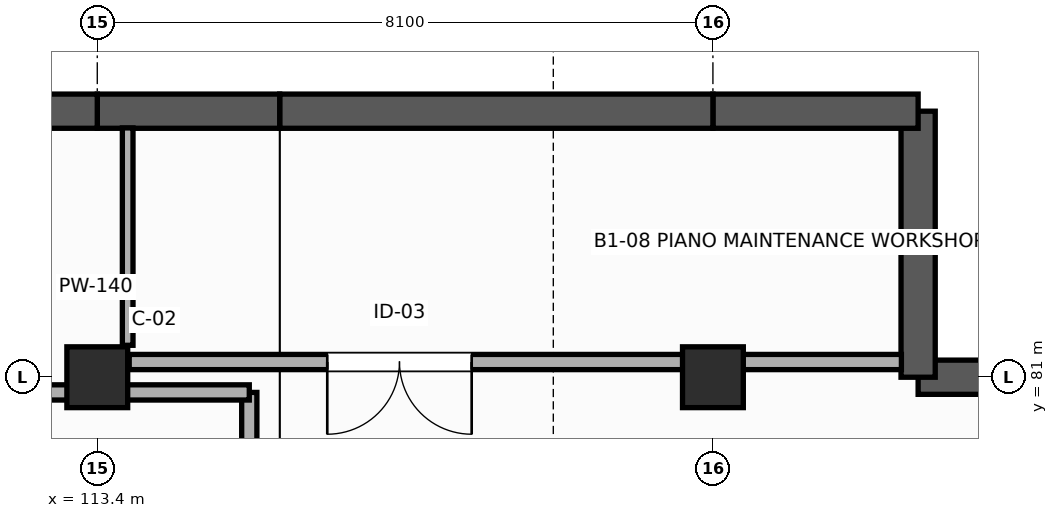
"""IFC4 building model, lengths in metres.
Left out: names, types, materials, properties, quantities, classifications, styles, units other than length and angle.
Written with IfcOpenShell. Run it as: python <this file> out.ifc"""

import sys

from ifc_helpers import new_model, si_unit, direction, frame, frame_2d, origin, origin_2d, place, context, subcontext, project, spatial, rectangle, extrude, element, fill, save


model = new_model("IFC4")
c1 = context("Model", 3, precision=1e-05, world=origin(), true_north=direction((0.0, 1.0)))
c2 = subcontext(c1, "Body", "Model", "MODEL_VIEW")
j1 = project(units=[si_unit("LENGTHUNIT", "METRE"), si_unit("PLANEANGLEUNIT", "RADIAN")], contexts=[c1])
p1 = place(None, origin())
s1 = spatial("IfcSite", under=j1, at=p1, CompositionType="ELEMENT")
p2 = place(p1, origin())
s2 = spatial("IfcBuilding", under=s1, at=p2, CompositionType="ELEMENT")
p3 = place(p2, frame((0.0, 0.0, -5.4)))
s3 = spatial("IfcBuildingStorey", under=s2, at=p3, CompositionType="ELEMENT", Elevation=-5.4)
for number, where, z_axis, x_axis in (
    (1, (113.4, 81.0, -0.4), (0.0, 0.0, 1.0), (1.0, 0.0, 0.0)),
    (2, (121.5, 81.0, -0.4), (0.0, 0.0, 1.0), (1.0, 0.0, 0.0)),
):
    element("IfcColumn", number, at=place(p3, frame(where, z_axis=z_axis, x_axis=x_axis)), inside=s3, PredefinedType="COLUMN", context=c2, shape_type="SweptSolid", body=[
        extrude(rectangle(XDim=0.8, YDim=0.8, at=origin_2d()), origin(), (0.0, 0.0, 1.0), 5.8),
    ])
p4 = place(p3, frame((129.2, 81.0, 0.0), z_axis=(0.0, 0.0, 1.0), x_axis=(-1.0, 0.0, 0.0)))
e3 = element("IfcWall", 3, at=p4, inside=s3, PredefinedType="USERDEFINED", context=c2, shape_type="SweptSolid", body=[
    extrude(rectangle(XDim=5.0, YDim=0.45, at=frame_2d((2.5, 0.0))), origin(), (0.0, 0.0, 1.0), 5.1),
])
p5 = place(p3, frame((124.2, 81.0, 0.0), z_axis=(0.0, 0.0, 1.0), x_axis=(0.0, 1.0, 0.0)))
e4 = element("IfcWall", 4, at=p5, inside=s3, PredefinedType="USERDEFINED", context=c2, shape_type="SweptSolid", body=[
    extrude(rectangle(XDim=3.5, YDim=0.45, at=frame_2d((1.75, 0.0))), origin(), (0.0, 0.0, 1.0), 5.1),
])
p6 = place(p3, frame((124.2, 84.5, 0.0), z_axis=(0.0, 0.0, 1.0), x_axis=(-1.0, 0.0, 0.0)))
e5 = element("IfcWall", 5, at=p6, inside=s3, PredefinedType="USERDEFINED", context=c2, shape_type="SweptSolid", body=[
    extrude(rectangle(XDim=2.7, YDim=0.45, at=frame_2d((1.35, 0.0))), origin(), (0.0, 0.0, 1.0), 5.1),
])
p7 = place(p3, frame((121.5, 84.5, 0.0), z_axis=(0.0, 0.0, 1.0), x_axis=(-1.0, 0.0, 0.0)))
e6 = element("IfcWall", 6, at=p7, inside=s3, PredefinedType="USERDEFINED", context=c2, shape_type="SweptSolid", body=[
    extrude(rectangle(XDim=5.7, YDim=0.45, at=frame_2d((2.85, 0.0))), origin(), (0.0, 0.0, 1.0), 5.1),
])
p8 = place(p3, frame((115.8, 84.5, 0.0), z_axis=(0.0, 0.0, 1.0), x_axis=(-1.0, 0.0, 0.0)))
e7 = element("IfcWall", 7, at=p8, inside=s3, PredefinedType="USERDEFINED", context=c2, shape_type="SweptSolid", body=[
    extrude(rectangle(XDim=2.4, YDim=0.45, at=frame_2d((1.2, 0.0))), origin(), (0.0, 0.0, 1.0), 5.1),
])
p9 = place(p3, frame((113.4, 84.5, 0.0), z_axis=(0.0, 0.0, 1.0), x_axis=(-1.0, 0.0, 0.0)))
e8 = element("IfcWall", 8, at=p9, inside=s3, PredefinedType="USERDEFINED", context=c2, shape_type="SweptSolid", body=[
    extrude(rectangle(XDim=8.1, YDim=0.45, at=frame_2d((4.05, 0.0))), origin(), (0.0, 0.0, 1.0), 5.1),
])
p10 = place(p3, frame((115.4, 80.8, 0.0), z_axis=(0.0, 0.0, 1.0), x_axis=(0.0, -1.0, 0.0)))
e9 = element("IfcWall", 9, at=p10, inside=s3, PredefinedType="PARTITIONING", context=c2, shape_type="SweptSolid", body=[
    extrude(rectangle(XDim=4.6, YDim=0.2, at=frame_2d((2.3, 0.0))), origin(), (0.0, 0.0, 1.0), 5.12),
])
p11 = place(p3, frame((106.399, 80.8, 0.0), z_axis=(0.0, 0.0, 1.0), x_axis=(1.0, 0.0, 0.0)))
e10 = element("IfcWall", 10, at=p11, inside=s3, PredefinedType="PARTITIONING", context=c2, shape_type="SweptSolid", body=[
    extrude(rectangle(XDim=9.001, YDim=0.2, at=frame_2d((4.5, 0.0))), origin(), (0.0, 0.0, 1.0), 4.254),
])
p12 = place(p11, frame((2.05, 0.0, 0.0)))
e11 = element("IfcOpeningElement", 11, at=p12, cuts=e10, PredefinedType="OPENING", context=c2, shape_type="SweptSolid", body=[
    extrude(rectangle(XDim=2.2, YDim=2.6, at=frame_2d((1.1, 1.3))), frame((0.0, 0.11, 0.0), z_axis=(0.0, -1.0, 0.0), x_axis=(1.0, 0.0, 0.0)), (0.0, 0.0, 1.0), 0.22),
])
p13 = place(p3, frame((123.98, 81.2, 0.0), z_axis=(0.0, 0.0, 1.0), x_axis=(-1.0, 0.0, 0.0)))
e12 = element("IfcWall", 12, at=p13, inside=s3, PredefinedType="PARTITIONING", context=c2, shape_type="SweptSolid", body=[
    extrude(rectangle(XDim=10.16, YDim=0.2, at=frame_2d((5.08, 0.0))), origin(), (0.0, 0.0, 1.0), 4.154),
])
p14 = place(p13, frame((5.654, 0.0, 0.0)))
e13 = element("IfcOpeningElement", 13, at=p14, cuts=e12, PredefinedType="OPENING", context=c2, shape_type="SweptSolid", body=[
    extrude(rectangle(XDim=1.9, YDim=2.4, at=frame_2d((0.95, 1.2))), frame((0.0, 0.11, 0.0), z_axis=(0.0, -1.0, 0.0), x_axis=(1.0, 0.0, 0.0)), (0.0, 0.0, 1.0), 0.22),
])
p15 = place(p3, frame((113.8, 81.42, 0.0), z_axis=(0.0, 0.0, 1.0), x_axis=(0.0, 1.0, 0.0)))
e14 = element("IfcWall", 14, at=p15, inside=s3, PredefinedType="PARTITIONING", context=c2, shape_type="SweptSolid", body=[
    extrude(rectangle(XDim=2.86, YDim=0.14, at=frame_2d((1.43, 0.0))), origin(), (0.0, 0.0, 1.0), 4.354),
])
p16 = place(p14, origin())
e15 = element("IfcDoor", 15, at=p16, inside=s3, OperationType="DOUBLE_DOOR_SINGLE_SWING", PredefinedType="DOOR", context=c2, shape_type="SweptSolid", body=[
    extrude(rectangle(XDim=1.9, YDim=2.4, at=frame_2d((0.95, 1.2))), frame((0.0, 0.025, 0.0), z_axis=(0.0, -1.0, 0.0), x_axis=(1.0, 0.0, 0.0)), (0.0, 0.0, 1.0), 0.05),
])
fill(e13, e15)
save(model, sys.argv[1])
